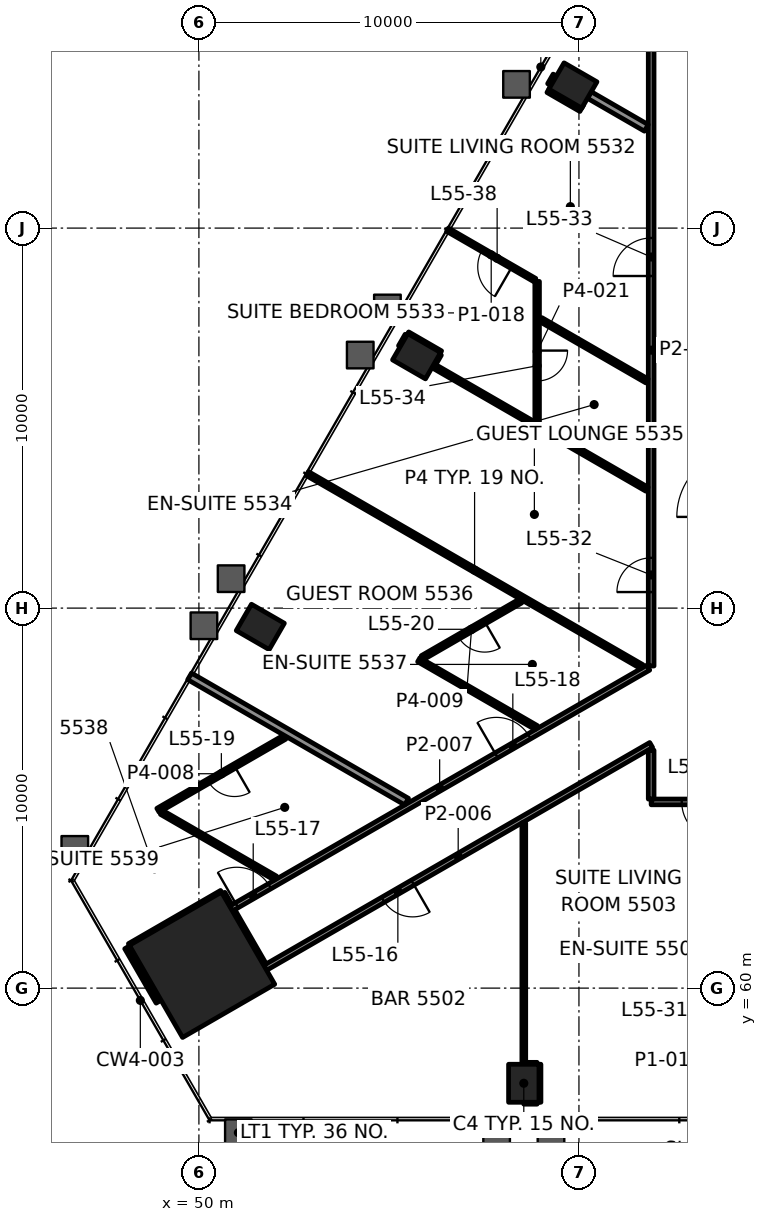
"""IFC4 building model, lengths in metres.
Left out: names, types, materials, properties, quantities, classifications, styles, units other than length and angle.
Written with IfcOpenShell. Run it as: python <this file> out.ifc"""

import sys

from ifc_helpers import new_model, si_unit, direction, frame, frame_2d, origin, origin_2d, place, context, subcontext, project, spatial, rectangle, hollow_rectangle, extrude, element, fill, save


model = new_model("IFC4")
c1 = context("Model", 3, precision=1e-05, world=origin(), true_north=direction((0.0, 1.0)))
c2 = subcontext(c1, "Body", "Model", "MODEL_VIEW")
j1 = project(units=[si_unit("LENGTHUNIT", "METRE"), si_unit("PLANEANGLEUNIT", "RADIAN")], contexts=[c1])
p1 = place(None, origin())
s1 = spatial("IfcSite", under=j1, at=p1, CompositionType="ELEMENT")
p2 = place(p1, origin())
s2 = spatial("IfcBuilding", under=s1, at=p2, CompositionType="ELEMENT")
p3 = place(p2, frame((0.0, 0.0, 233.8)))
s3 = spatial("IfcBuildingStorey", under=s2, at=p3, CompositionType="ELEMENT", Elevation=233.8)
p4 = place(p3, frame((50.082, 60.614, 0.0), z_axis=(0.0, 0.0, 1.0), x_axis=(0.5, -0.866025403784, 0.0)))
e1 = element("IfcColumn", 1, at=p4, inside=s3, PredefinedType="COLUMN", context=c2, shape_type="SweptSolid", body=[
    extrude(rectangle(XDim=2.8, YDim=2.8, at=origin_2d()), origin(), (0.0, 0.0, 1.0), 3.9),
])
for number, where, z_axis, x_axis in (
    (2, (58.549, 57.496, -0.0), (0.0, 0.0, 1.0), (1.0, 0.0, 0.0)),
    (3, (59.841, 83.752, -0.0), (0.0, 0.0, 1.0), (-0.5, -0.866, 0.0)),
    (4, (55.728, 76.628, -0.0), (0.0, 0.0, 1.0), (-0.5, -0.866, 0.0)),
    (5, (51.615, 69.505, -0.0), (0.0, 0.0, 1.0), (-0.5, -0.866, 0.0)),
):
    element("IfcColumn", number, at=place(p3, frame(where, z_axis=z_axis, x_axis=x_axis)), inside=s3, PredefinedType="COLUMN", context=c2, shape_type="SweptSolid", body=[
        extrude(hollow_rectangle(XDim=0.8, YDim=1.0, WallThickness=0.05, at=origin_2d()), origin(), (0.0, 0.0, 1.0), 3.9),
    ])
p5 = place(p3, frame((58.549, 56.996, 0.0), z_axis=(0.0, 0.0, 1.0), x_axis=(1.0, 0.0, 0.0)))
e6 = element("IfcWall", 6, at=p5, inside=s3, PredefinedType="PARTITIONING", context=c2, shape_type="SweptSolid", body=[
    extrude(rectangle(XDim=0.35, YDim=0.1, at=frame_2d((0.175, 0.0))), origin(), (0.0, 0.0, 1.0), 3.1),
])
p6 = place(p3, frame((58.609, 57.996, 0.0), z_axis=(0.0, 0.0, 1.0), x_axis=(1.0, 0.0, 0.0)))
e7 = element("IfcWall", 7, at=p6, inside=s3, PredefinedType="PARTITIONING", context=c2, shape_type="SweptSolid", body=[
    extrude(rectangle(XDim=0.29, YDim=0.1, at=frame_2d((0.145, 0.0))), origin(), (0.0, 0.0, 1.0), 3.1),
])
p7 = place(p3, frame((88.099, 64.9, 0.0), z_axis=(0.0, 0.0, 1.0), x_axis=(-1.0, 0.0, 0.0)))
e8 = element("IfcWall", 8, at=p7, inside=s3, PredefinedType="PARTITIONING", context=c2, shape_type="SweptSolid", body=[
    extrude(rectangle(XDim=26.199, YDim=0.15, at=frame_2d((13.1, 0.0))), origin(), (0.0, 0.0, 1.0), 3.1),
])
p8 = place(p7, frame((2.088, 0.0, 0.0)))
e9 = element("IfcOpeningElement", 9, at=p8, cuts=e8, PredefinedType="OPENING", context=c2, shape_type="SweptSolid", body=[
    extrude(rectangle(XDim=0.9, YDim=2.1, at=frame_2d((0.45, 1.05))), frame((0.0, 0.085, 0.0), z_axis=(0.0, -1.0, 0.0), x_axis=(1.0, 0.0, 0.0)), (0.0, 0.0, 1.0), 0.17),
])
p9 = place(p7, frame((5.4, 0.0, 0.0)))
e10 = element("IfcOpeningElement", 10, at=p9, cuts=e8, PredefinedType="OPENING", context=c2, shape_type="SweptSolid", body=[
    extrude(rectangle(XDim=1.0, YDim=2.1, at=frame_2d((0.5, 1.05))), frame((0.0, 0.085, 0.0), z_axis=(0.0, -1.0, 0.0), x_axis=(1.0, 0.0, 0.0)), (0.0, 0.0, 1.0), 0.17),
])
p10 = place(p7, frame((17.946, 0.0, 0.0)))
e11 = element("IfcOpeningElement", 11, at=p10, cuts=e8, PredefinedType="OPENING", context=c2, shape_type="SweptSolid", body=[
    extrude(rectangle(XDim=1.0, YDim=2.1, at=frame_2d((0.5, 1.05))), frame((0.0, 0.085, 0.0), z_axis=(0.0, -1.0, 0.0), x_axis=(1.0, 0.0, 0.0)), (0.0, 0.0, 1.0), 0.17),
])
p11 = place(p7, frame((24.395, 0.0, 0.0)))
e12 = element("IfcOpeningElement", 12, at=p11, cuts=e8, PredefinedType="OPENING", context=c2, shape_type="SweptSolid", body=[
    extrude(rectangle(XDim=1.0, YDim=2.1, at=frame_2d((0.5, 1.05))), frame((0.0, 0.085, 0.0), z_axis=(0.0, -1.0, 0.0), x_axis=(1.0, 0.0, 0.0)), (0.0, 0.0, 1.0), 0.17),
])
p12 = place(p3, frame((61.9, 66.397, 0.0), z_axis=(0.0, 0.0, 1.0), x_axis=(-0.866028172479, -0.49999520445, 0.0)))
e13 = element("IfcWall", 13, at=p12, inside=s3, PredefinedType="PARTITIONING", context=c2, shape_type="SweptSolid", body=[
    extrude(rectangle(XDim=11.726, YDim=0.15, at=frame_2d((5.863, 0.0))), origin(), (0.0, 0.0, 1.0), 2.947),
])
p13 = place(p12, frame((7.246, 0.0, 0.0)))
e14 = element("IfcOpeningElement", 14, at=p13, cuts=e13, PredefinedType="OPENING", context=c2, shape_type="SweptSolid", body=[
    extrude(rectangle(XDim=0.9, YDim=2.1, at=frame_2d((0.45, 1.05))), frame((0.0, 0.085, 0.0), z_axis=(0.0, -1.0, 0.0), x_axis=(1.0, 0.0, 0.0)), (0.0, 0.0, 1.0), 0.17),
])
p14 = place(p3, frame((50.844, 62.093, 0.0), z_axis=(0.0, 0.0, 1.0), x_axis=(0.866032955338, 0.499986920098, 0.0)))
e15 = element("IfcWall", 15, at=p14, inside=s3, PredefinedType="PARTITIONING", context=c2, shape_type="SweptSolid", body=[
    extrude(rectangle(XDim=12.679, YDim=0.15, at=frame_2d((6.339, 0.0))), origin(), (0.0, 0.0, 1.0), 3.1),
])
p15 = place(p14, frame((0.175, 0.0, 0.0)))
e16 = element("IfcOpeningElement", 16, at=p15, cuts=e15, PredefinedType="OPENING", context=c2, shape_type="SweptSolid", body=[
    extrude(rectangle(XDim=1.0, YDim=2.1, at=frame_2d((0.5, 1.05))), frame((0.0, 0.085, 0.0), z_axis=(0.0, -1.0, 0.0), x_axis=(1.0, 0.0, 0.0)), (0.0, 0.0, 1.0), 0.17),
])
p16 = place(p14, frame((8.063, 0.0, 0.0)))
e17 = element("IfcOpeningElement", 17, at=p16, cuts=e15, PredefinedType="OPENING", context=c2, shape_type="SweptSolid", body=[
    extrude(rectangle(XDim=1.0, YDim=2.1, at=frame_2d((0.5, 1.05))), frame((0.0, 0.085, 0.0), z_axis=(0.0, -1.0, 0.0), x_axis=(1.0, 0.0, 0.0)), (0.0, 0.0, 1.0), 0.17),
])
p17 = place(p3, frame((48.17, 61.126, 0.0), z_axis=(0.0, 0.0, 1.0), x_axis=(0.866034573852, 0.49998411664, 0.0)))
e18 = element("IfcWall", 18, at=p17, inside=s3, PredefinedType="PARTITIONING", context=c2, shape_type="SweptSolid", body=[
    extrude(rectangle(XDim=2.8, YDim=0.1, at=frame_2d((1.4, 0.0))), origin(), (0.0, 0.0, 1.0), 3.1),
])
p18 = place(p3, frame((52.258, 66.604, 0.0), z_axis=(0.0, 0.0, 1.0), x_axis=(-0.86601030197, -0.500026156197, 0.0)))
e19 = element("IfcWall", 19, at=p18, inside=s3, PredefinedType="PARTITIONING", context=c2, shape_type="SweptSolid", body=[
    extrude(rectangle(XDim=3.85, YDim=0.12, at=frame_2d((1.925, 0.0))), origin(), (0.0, 0.0, 1.0), 3.1),
])
p19 = place(p18, frame((1.525, 0.0, 0.0)))
e20 = element("IfcOpeningElement", 20, at=p19, cuts=e19, PredefinedType="OPENING", context=c2, shape_type="SweptSolid", body=[
    extrude(rectangle(XDim=0.8, YDim=2.1, at=frame_2d((0.4, 1.05))), frame((0.0, 0.07, 0.0), z_axis=(0.0, -1.0, 0.0), x_axis=(1.0, 0.0, 0.0)), (0.0, 0.0, 1.0), 0.14),
])
p20 = place(p3, frame((58.467, 70.189, 0.0), z_axis=(0.0, 0.0, 1.0), x_axis=(-0.86604676013, -0.4999630079, 0.0)))
e21 = element("IfcWall", 21, at=p20, inside=s3, PredefinedType="PARTITIONING", context=c2, shape_type="SweptSolid", body=[
    extrude(rectangle(XDim=2.987, YDim=0.12, at=frame_2d((1.494, 0.0))), origin(), (0.0, 0.0, 1.0), 3.1),
])
p21 = place(p20, frame((1.094, 0.0, 0.0)))
e22 = element("IfcOpeningElement", 22, at=p21, cuts=e21, PredefinedType="OPENING", context=c2, shape_type="SweptSolid", body=[
    extrude(rectangle(XDim=0.8, YDim=2.1, at=frame_2d((0.4, 1.05))), frame((0.0, 0.07, 0.0), z_axis=(0.0, -1.0, 0.0), x_axis=(1.0, 0.0, 0.0)), (0.0, 0.0, 1.0), 0.14),
])
p22 = place(p3, frame((56.192, 76.431, 0.0), z_axis=(0.0, 0.0, 1.0), x_axis=(0.500136839105, 0.865946385275, 0.0)))
e23 = element("IfcWall", 23, at=p22, inside=s3, PredefinedType="PARTITIONING", context=c2, shape_type="SweptSolid", body=[
    extrude(rectangle(XDim=0.289, YDim=0.1, at=frame_2d((0.145, 0.0))), origin(), (0.0, 0.0, 1.0), 3.1),
])
p23 = place(p3, frame((55.296, 76.879, 0.0), z_axis=(0.0, 0.0, 1.0), x_axis=(0.500126092966, 0.865952591736, 0.0)))
e24 = element("IfcWall", 24, at=p23, inside=s3, PredefinedType="PARTITIONING", context=c2, shape_type="SweptSolid", body=[
    extrude(rectangle(XDim=0.349, YDim=0.1, at=frame_2d((0.175, 0.0))), origin(), (0.0, 0.0, 1.0), 3.1),
])
p24 = place(p3, frame((59.263, 83.751, 0.0), z_axis=(0.0, 0.0, 1.0), x_axis=(0.499941024108, 0.866059450854, 0.0)))
e25 = element("IfcWall", 25, at=p24, inside=s3, PredefinedType="PARTITIONING", context=c2, shape_type="SweptSolid", body=[
    extrude(rectangle(XDim=0.29, YDim=0.2, at=frame_2d((0.145, 0.0))), origin(), (0.0, 0.0, 1.0), 3.1),
])
p25 = place(p3, frame((61.9, 64.975, 0.0), z_axis=(0.0, 0.0, 1.0), x_axis=(0.0, 1.0, 0.0)))
e26 = element("IfcWall", 26, at=p25, inside=s3, PredefinedType="PARTITIONING", context=c2, shape_type="SweptSolid", body=[
    extrude(rectangle(XDim=1.286, YDim=0.15, at=frame_2d((0.643, 0.0))), origin(), (0.0, 0.0, 1.0), 2.947),
])
p26 = place(p3, frame((61.9, 68.476, 0.0), z_axis=(0.0, 0.0, 1.0), x_axis=(0.0, 1.0, 0.0)))
e27 = element("IfcWall", 27, at=p26, inside=s3, PredefinedType="PARTITIONING", context=c2, shape_type="SweptSolid", body=[
    extrude(rectangle(XDim=16.624, YDim=0.15, at=frame_2d((8.312, 0.0))), origin(), (0.0, 0.0, 1.0), 3.1),
])
p27 = place(p26, frame((1.946, 0.0, 0.0)))
e28 = element("IfcOpeningElement", 28, at=p27, cuts=e27, PredefinedType="OPENING", context=c2, shape_type="SweptSolid", body=[
    extrude(rectangle(XDim=0.9, YDim=2.1, at=frame_2d((0.45, 1.05))), frame((0.0, 0.085, 0.0), z_axis=(0.0, -1.0, 0.0), x_axis=(1.0, 0.0, 0.0)), (0.0, 0.0, 1.0), 0.17),
])
p28 = place(p26, frame((10.263, 0.0, 0.0)))
e29 = element("IfcOpeningElement", 29, at=p28, cuts=e27, PredefinedType="OPENING", context=c2, shape_type="SweptSolid", body=[
    extrude(rectangle(XDim=1.0, YDim=2.1, at=frame_2d((0.5, 1.05))), frame((0.0, 0.085, 0.0), z_axis=(0.0, -1.0, 0.0), x_axis=(1.0, 0.0, 0.0)), (0.0, 0.0, 1.0), 0.17),
])
p29 = place(p3, frame((58.949, 56.996, 0.0), z_axis=(0.0, 0.0, 1.0), x_axis=(0.0, 1.0, 0.0)))
e30 = element("IfcWall", 30, at=p29, inside=s3, PredefinedType="PARTITIONING", context=c2, shape_type="SweptSolid", body=[
    extrude(rectangle(XDim=1.0, YDim=0.1, at=frame_2d((0.5, 0.0))), origin(), (0.0, 0.0, 1.0), 3.022),
])
p30 = place(p3, frame((58.9, 78.596, 0.0), z_axis=(0.0, 0.0, 1.0), x_axis=(0.0, -1.0, 0.0)))
e31 = element("IfcWall", 31, at=p30, inside=s3, PredefinedType="PARTITIONING", context=c2, shape_type="SweptSolid", body=[
    extrude(rectangle(XDim=3.69, YDim=0.12, at=frame_2d((1.845, 0.0))), origin(), (0.0, 0.0, 1.0), 3.1),
])
p31 = place(p30, frame((1.82, 0.0, 0.0)))
e32 = element("IfcOpeningElement", 32, at=p31, cuts=e31, PredefinedType="OPENING", context=c2, shape_type="SweptSolid", body=[
    extrude(rectangle(XDim=0.8, YDim=2.1, at=frame_2d((0.4, 1.05))), frame((0.0, 0.07, 0.0), z_axis=(0.0, -1.0, 0.0), x_axis=(1.0, 0.0, 0.0)), (0.0, 0.0, 1.0), 0.14),
])
p32 = place(p3, frame((58.549, 57.996, 0.0), z_axis=(0.0, 0.0, 1.0), x_axis=(0.0, 1.0, 0.0)))
e33 = element("IfcWall", 33, at=p32, inside=s3, PredefinedType="PARTITIONING", context=c2, shape_type="SweptSolid", body=[
    extrude(rectangle(XDim=6.35, YDim=0.1, at=frame_2d((3.175, 0.0))), origin(), (0.0, 0.0, 1.0), 2.947),
])
p33 = place(p3, frame((51.707, 60.6, 0.0), z_axis=(0.0, 0.0, 1.0), x_axis=(-0.499991515992, 0.866030301974, 0.0)))
e34 = element("IfcWall", 34, at=p33, inside=s3, PredefinedType="PARTITIONING", context=c2, shape_type="SweptSolid", body=[
    extrude(rectangle(XDim=1.649, YDim=0.15, at=frame_2d((0.825, 0.0))), origin(), (0.0, 0.0, 1.0), 2.947),
])
p34 = place(p3, frame((48.918, 59.63, 0.0), z_axis=(0.0, 0.0, 1.0), x_axis=(-0.500029155639, 0.866008570114, 0.0)))
e35 = element("IfcWall", 35, at=p34, inside=s3, PredefinedType="PARTITIONING", context=c2, shape_type="SweptSolid", body=[
    extrude(rectangle(XDim=1.654, YDim=0.1, at=frame_2d((0.827, 0.0))), origin(), (0.0, 0.0, 1.0), 3.1),
])
p35 = place(p3, frame((61.773, 82.637, 0.0), z_axis=(0.0, 0.0, 1.0), x_axis=(-0.866082241464, 0.499901541327, 0.0)))
e36 = element("IfcWall", 36, at=p35, inside=s3, PredefinedType="PARTITIONING", context=c2, shape_type="SweptSolid", body=[
    extrude(rectangle(XDim=1.731, YDim=0.2, at=frame_2d((0.865, 0.0))), origin(), (0.0, 0.0, 1.0), 3.1),
])
p36 = place(p3, frame((60.074, 83.156, 0.0), z_axis=(0.0, 0.0, 1.0), x_axis=(-0.866010750942, 0.50002537861, 0.0)))
e37 = element("IfcWall", 37, at=p36, inside=s3, PredefinedType="PARTITIONING", context=c2, shape_type="SweptSolid", body=[
    extrude(rectangle(XDim=1.0, YDim=0.2, at=frame_2d((0.5, 0.0))), origin(), (0.0, 0.0, 1.0), 3.022),
])
p37 = place(p3, frame((58.84, 78.632, 0.0), z_axis=(0.0, 0.0, 1.0), x_axis=(-0.866049230234, 0.499958729108, 0.0)))
e38 = element("IfcWall", 38, at=p37, inside=s3, PredefinedType="PARTITIONING", context=c2, shape_type="SweptSolid", body=[
    extrude(rectangle(XDim=2.654, YDim=0.1, at=frame_2d((1.327, 0.0))), origin(), (0.0, 0.0, 1.0), 3.022),
])
p38 = place(p37, frame((0.697, 0.0, 0.0)))
e39 = element("IfcOpeningElement", 39, at=p38, cuts=e38, PredefinedType="OPENING", context=c2, shape_type="SweptSolid", body=[
    extrude(rectangle(XDim=0.9, YDim=2.1, at=frame_2d((0.45, 1.05))), frame((0.0, 0.06, 0.0), z_axis=(0.0, -1.0, 0.0), x_axis=(1.0, 0.0, 0.0)), (0.0, 0.0, 1.0), 0.12),
])
p39 = place(p3, frame((61.79, 75.978, 0.0), z_axis=(0.0, 0.0, 1.0), x_axis=(-0.866033195618, 0.499986503906, 0.0)))
e40 = element("IfcWall", 40, at=p39, inside=s3, PredefinedType="PARTITIONING", context=c2, shape_type="SweptSolid", body=[
    extrude(rectangle(XDim=3.228, YDim=0.12, at=frame_2d((1.614, 0.0))), origin(), (0.0, 0.0, 1.0), 3.1),
])
p40 = place(p3, frame((56.361, 76.725, 0.0), z_axis=(0.0, 0.0, 1.0), x_axis=(-0.866039090965, 0.499976292358, 0.0)))
e41 = element("IfcWall", 41, at=p40, inside=s3, PredefinedType="PARTITIONING", context=c2, shape_type="SweptSolid", body=[
    extrude(rectangle(XDim=0.999, YDim=0.1, at=frame_2d((0.5, 0.0))), origin(), (0.0, 0.0, 1.0), 3.022),
])
p41 = place(p3, frame((61.79, 73.128, 0.0), z_axis=(0.0, 0.0, 1.0), x_axis=(-0.866022320763, 0.500005339912, 0.0)))
e42 = element("IfcWall", 42, at=p41, inside=s3, PredefinedType="PARTITIONING", context=c2, shape_type="SweptSolid", body=[
    extrude(rectangle(XDim=6.5, YDim=0.12, at=frame_2d((3.25, 0.0))), origin(), (0.0, 0.0, 1.0), 3.1),
])
p42 = place(p3, frame((61.652, 68.46, 0.0), z_axis=(0.0, 0.0, 1.0), x_axis=(-0.866026287368, 0.499998469586, 0.0)))
e43 = element("IfcWall", 43, at=p42, inside=s3, PredefinedType="PARTITIONING", context=c2, shape_type="SweptSolid", body=[
    extrude(rectangle(XDim=10.158, YDim=0.12, at=frame_2d((5.079, 0.0))), origin(), (0.0, 0.0, 1.0), 3.022),
])
p43 = place(p3, frame((58.876, 66.856, 0.0), z_axis=(0.0, 0.0, 1.0), x_axis=(-0.866028357664, 0.499994883695, 0.0)))
e44 = element("IfcWall", 44, at=p43, inside=s3, PredefinedType="PARTITIONING", context=c2, shape_type="SweptSolid", body=[
    extrude(rectangle(XDim=3.568, YDim=0.12, at=frame_2d((1.784, 0.0))), origin(), (0.0, 0.0, 1.0), 3.1),
])
p44 = place(p3, frame((55.465, 64.907, 0.0), z_axis=(0.0, 0.0, 1.0), x_axis=(-0.866024015056, 0.50000240534, 0.0)))
e45 = element("IfcWall", 45, at=p44, inside=s3, PredefinedType="PARTITIONING", context=c2, shape_type="SweptSolid", body=[
    extrude(rectangle(XDim=6.593, YDim=0.2, at=frame_2d((3.296, 0.0))), origin(), (0.0, 0.0, 1.0), 3.1),
])
p45 = place(p3, frame((52.014, 62.895, 0.0), z_axis=(0.0, 0.0, 1.0), x_axis=(-0.866045730533, 0.499964791386, 0.0)))
e46 = element("IfcWall", 46, at=p45, inside=s3, PredefinedType="PARTITIONING", context=c2, shape_type="SweptSolid", body=[
    extrude(rectangle(XDim=3.459, YDim=0.12, at=frame_2d((1.729, 0.0))), origin(), (0.0, 0.0, 1.0), 3.1),
])
p46 = place(p3, frame((50.807, 62.158, 0.0), z_axis=(0.0, 0.0, 1.0), x_axis=(-0.500060622324, 0.86599040064, 0.0)))
e47 = element("IfcWall", 47, at=p46, inside=s3, PredefinedType="PARTITIONING", context=c2, shape_type="SweptSolid", body=[
    extrude(rectangle(XDim=0.375, YDim=0.15, at=frame_2d((0.188, 0.0))), origin(), (0.0, 0.0, 1.0), 3.1),
])
p47 = place(p11, origin())
e48 = element("IfcDoor", 48, at=p47, inside=s3, OperationType="SINGLE_SWING_LEFT", PredefinedType="DOOR", context=c2, shape_type="SweptSolid", body=[
    extrude(rectangle(XDim=1.0, YDim=2.1, at=frame_2d((0.5, 1.05))), frame((0.0, 0.025, 0.0), z_axis=(0.0, -1.0, 0.0), x_axis=(1.0, 0.0, 0.0)), (0.0, 0.0, 1.0), 0.05),
])
fill(e12, e48)
p48 = place(p13, origin())
e49 = element("IfcDoor", 49, at=p48, inside=s3, OperationType="SINGLE_SWING_RIGHT", PredefinedType="DOOR", context=c2, shape_type="SweptSolid", body=[
    extrude(rectangle(XDim=0.9, YDim=2.1, at=frame_2d((0.45, 1.05))), frame((0.0, 0.025, 0.0), z_axis=(0.0, -1.0, 0.0), x_axis=(1.0, 0.0, 0.0)), (0.0, 0.0, 1.0), 0.05),
])
fill(e14, e49)
p49 = place(p15, origin())
e50 = element("IfcDoor", 50, at=p49, inside=s3, OperationType="SINGLE_SWING_LEFT", PredefinedType="DOOR", context=c2, shape_type="SweptSolid", body=[
    extrude(rectangle(XDim=1.0, YDim=2.1, at=frame_2d((0.5, 1.05))), frame((0.0, 0.025, 0.0), z_axis=(0.0, -1.0, 0.0), x_axis=(1.0, 0.0, 0.0)), (0.0, 0.0, 1.0), 0.05),
])
fill(e16, e50)
p50 = place(p16, origin())
e51 = element("IfcDoor", 51, at=p50, inside=s3, OperationType="SINGLE_SWING_LEFT", PredefinedType="DOOR", context=c2, shape_type="SweptSolid", body=[
    extrude(rectangle(XDim=1.0, YDim=2.1, at=frame_2d((0.5, 1.05))), frame((0.0, 0.025, 0.0), z_axis=(0.0, -1.0, 0.0), x_axis=(1.0, 0.0, 0.0)), (0.0, 0.0, 1.0), 0.05),
])
fill(e17, e51)
p51 = place(p19, origin())
e52 = element("IfcDoor", 52, at=p51, inside=s3, OperationType="SINGLE_SWING_LEFT", PredefinedType="DOOR", context=c2, shape_type="SweptSolid", body=[
    extrude(rectangle(XDim=0.8, YDim=2.1, at=frame_2d((0.4, 1.05))), frame((0.0, 0.025, 0.0), z_axis=(0.0, -1.0, 0.0), x_axis=(1.0, 0.0, 0.0)), (0.0, 0.0, 1.0), 0.05),
])
fill(e20, e52)
p52 = place(p21, origin())
e53 = element("IfcDoor", 53, at=p52, inside=s3, OperationType="SINGLE_SWING_LEFT", PredefinedType="DOOR", context=c2, shape_type="SweptSolid", body=[
    extrude(rectangle(XDim=0.8, YDim=2.1, at=frame_2d((0.4, 1.05))), frame((0.0, 0.025, 0.0), z_axis=(0.0, -1.0, 0.0), x_axis=(1.0, 0.0, 0.0)), (0.0, 0.0, 1.0), 0.05),
])
fill(e22, e53)
p53 = place(p27, origin())
e54 = element("IfcDoor", 54, at=p53, inside=s3, OperationType="SINGLE_SWING_RIGHT", PredefinedType="DOOR", context=c2, shape_type="SweptSolid", body=[
    extrude(rectangle(XDim=0.9, YDim=2.1, at=frame_2d((0.45, 1.05))), frame((0.0, 0.025, 0.0), z_axis=(0.0, -1.0, 0.0), x_axis=(1.0, 0.0, 0.0)), (0.0, 0.0, 1.0), 0.05),
])
fill(e28, e54)
p54 = place(p28, origin())
e55 = element("IfcDoor", 55, at=p54, inside=s3, OperationType="SINGLE_SWING_LEFT", PredefinedType="DOOR", context=c2, shape_type="SweptSolid", body=[
    extrude(rectangle(XDim=1.0, YDim=2.1, at=frame_2d((0.5, 1.05))), frame((0.0, 0.025, 0.0), z_axis=(0.0, -1.0, 0.0), x_axis=(1.0, 0.0, 0.0)), (0.0, 0.0, 1.0), 0.05),
])
fill(e29, e55)
p55 = place(p31, origin())
e56 = element("IfcDoor", 56, at=p55, inside=s3, OperationType="SINGLE_SWING_RIGHT", PredefinedType="DOOR", context=c2, shape_type="SweptSolid", body=[
    extrude(rectangle(XDim=0.8, YDim=2.1, at=frame_2d((0.4, 1.05))), frame((0.0, 0.025, 0.0), z_axis=(0.0, -1.0, 0.0), x_axis=(1.0, 0.0, 0.0)), (0.0, 0.0, 1.0), 0.05),
])
fill(e32, e56)
p56 = place(p38, origin())
e57 = element("IfcDoor", 57, at=p56, inside=s3, OperationType="SINGLE_SWING_RIGHT", PredefinedType="DOOR", context=c2, shape_type="SweptSolid", body=[
    extrude(rectangle(XDim=0.9, YDim=2.1, at=frame_2d((0.45, 1.05))), frame((0.0, 0.025, 0.0), z_axis=(0.0, -1.0, 0.0), x_axis=(1.0, 0.0, 0.0)), (0.0, 0.0, 1.0), 0.05),
])
fill(e39, e57)
p57 = place(p3, origin())
p58 = place(p57, frame((53.067, 56.521, 0.15), z_axis=(0.0, 0.0, 1.0), x_axis=(1.0, 0.0, 0.0)))
p59 = place(p58, origin())
e58 = element("IfcWindow", 58, at=p59, inside=s3, PartitioningType="SINGLE_PANEL", PredefinedType="WINDOW", context=c2, shape_type="SweptSolid", body=[
    extrude(rectangle(XDim=2.667, YDim=3.55, at=frame_2d((1.333, 1.775))), frame((0.0, 0.03, 0.0), z_axis=(0.0, -1.0, 0.0), x_axis=(1.0, 0.0, 0.0)), (0.0, 0.0, 1.0), 0.06),
])
p60 = place(p57, frame((53.483, 74.69, 0.15), z_axis=(0.0, 0.0, 1.0), x_axis=(-0.5, -0.866025, 0.0)))
p61 = place(p60, origin())
e59 = element("IfcWindow", 59, at=p61, inside=s3, PartitioningType="SINGLE_PANEL", PredefinedType="WINDOW", context=c2, shape_type="SweptSolid", body=[
    extrude(rectangle(XDim=2.667, YDim=3.55, at=frame_2d((1.333, 1.775))), frame((0.0, 0.03, 0.0), z_axis=(0.0, -1.0, 0.0), x_axis=(1.0, 0.0, 0.0)), (0.0, 0.0, 1.0), 0.06),
])
save(model, sys.argv[1])
